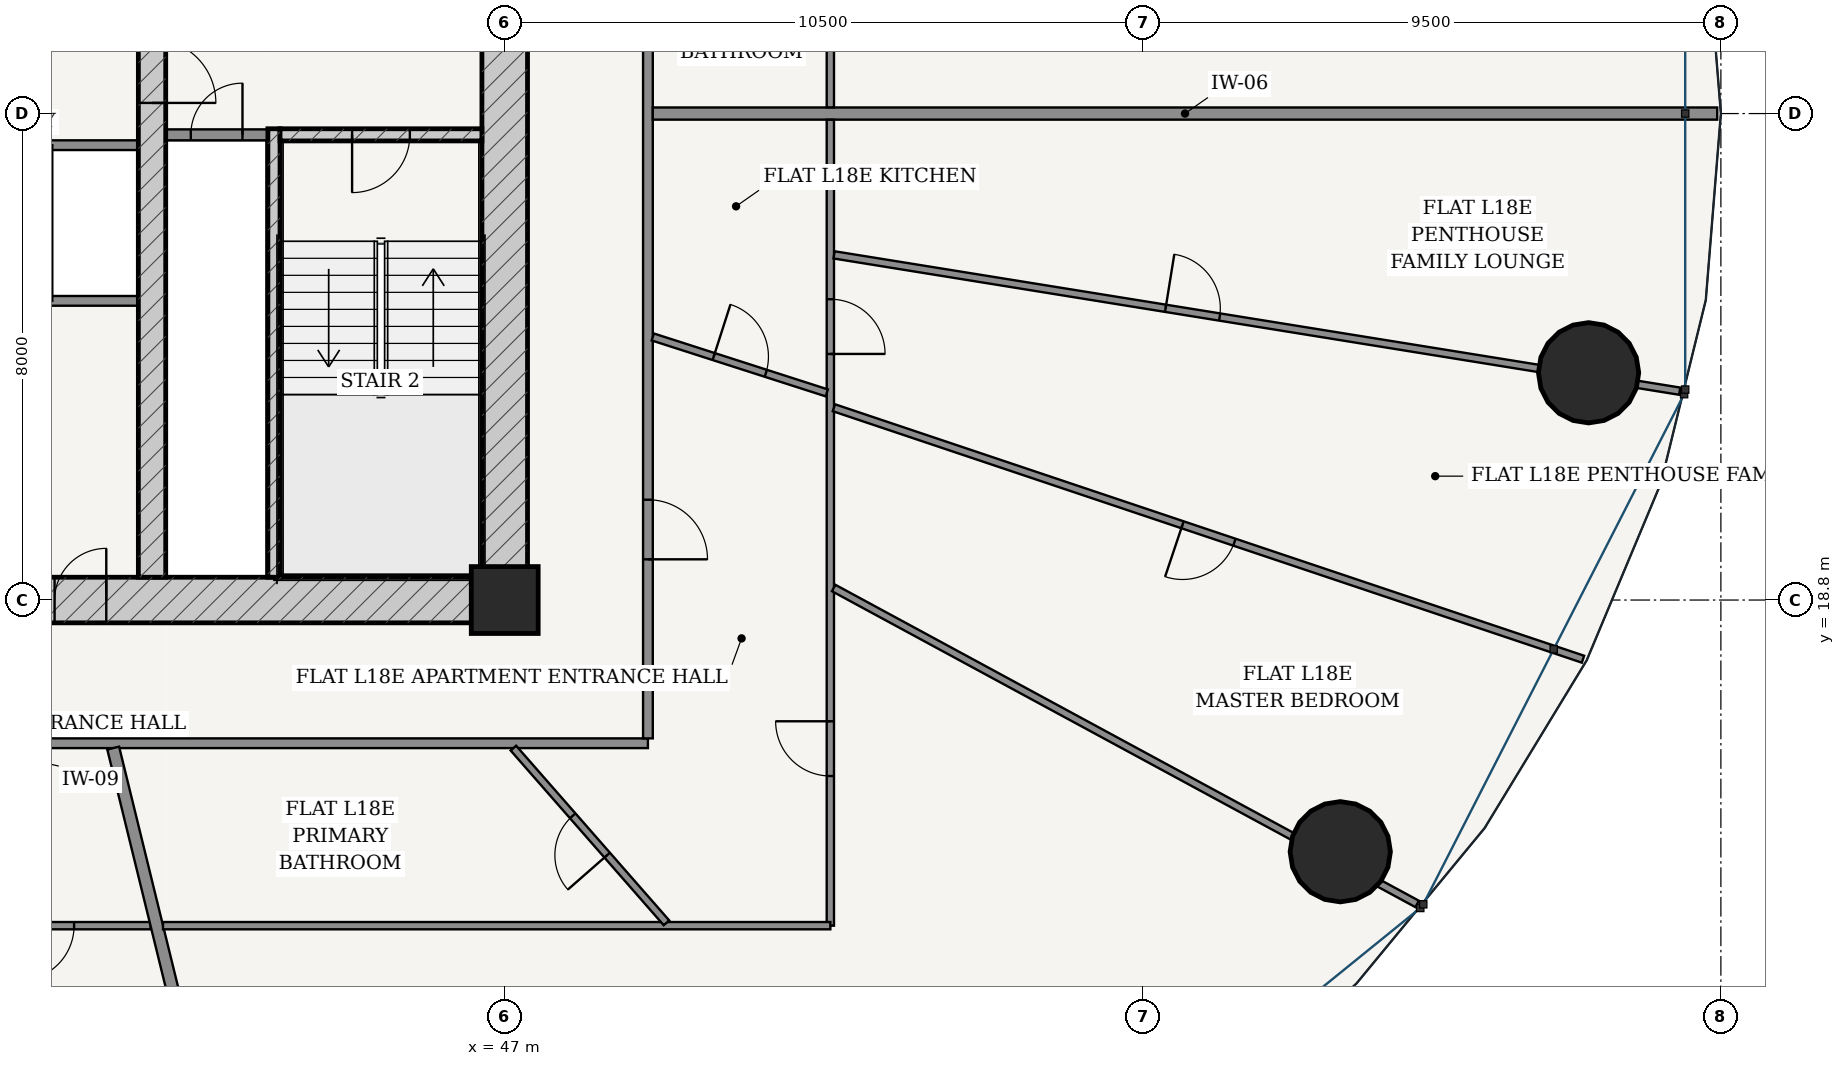
"""IFC4 building model, lengths in metres.
Left out: names, types, materials, properties, quantities, classifications, styles, units other than length and angle.
Written with IfcOpenShell. Run it as: python <this file> out.ifc"""

import sys

from ifc_helpers import new_model, si_unit, direction, frame, frame_2d, origin, origin_2d, place, context, subcontext, project, spatial, rectangle, hollow_circle, extrude, source, transform, mapped, element, fill, save


model = new_model("IFC4")
c1 = context("Model", 3, precision=1e-05, world=origin(), true_north=direction((-0.2419218956, 0.970295726276)))
c2 = subcontext(c1, "Body", "Model", "MODEL_VIEW")
j1 = project(units=[si_unit("LENGTHUNIT", "METRE"), si_unit("PLANEANGLEUNIT", "RADIAN")], contexts=[c1])
p1 = place(None, origin())
s1 = spatial("IfcSite", under=j1, at=p1, CompositionType="ELEMENT")
p2 = place(p1, origin())
s2 = spatial("IfcBuilding", under=s1, at=p2, CompositionType="ELEMENT")
p3 = place(p2, frame((0.0, 0.0, 70.8)))
s3 = spatial("IfcBuildingStorey", under=s2, at=p3, CompositionType="ELEMENT", Elevation=70.8)
p4 = place(p3, frame((47.0, 18.8, 0.0), z_axis=(0.0, 0.0, 1.0), x_axis=(1.0, 0.0, 0.0)))
e1 = element("IfcColumn", 1, at=p4, inside=s3, PredefinedType="COLUMN", context=c2, shape_type="SweptSolid", body=[
    extrude(rectangle(XDim=1.1, YDim=1.1, at=origin_2d()), origin(), (0.0, 0.0, 1.0), 3.6),
])
p5 = place(p3, frame((28.625, 18.8, 0.0), z_axis=(0.0, 0.0, 1.0), x_axis=(1.0, 0.0, 0.0)))
e2 = element("IfcWall", 2, at=p5, inside=s3, PredefinedType="SHEAR", context=c2, shape_type="SweptSolid", body=[
    extrude(rectangle(XDim=18.75, YDim=0.75, at=frame_2d((9.375, 0.0))), origin(), (0.0, 0.0, 1.0), 3.15),
])
p6 = place(p5, frame((6.927, 0.0, 0.0)))
e3 = element("IfcOpeningElement", 3, at=p6, cuts=e2, PredefinedType="OPENING", context=c2, shape_type="SweptSolid", body=[
    extrude(rectangle(XDim=0.85, YDim=2.1, at=frame_2d((0.425, 1.05))), frame((0.0, 0.385, 0.0), z_axis=(0.0, -1.0, 0.0), x_axis=(1.0, 0.0, 0.0)), (0.0, 0.0, 1.0), 0.77),
])
p7 = place(p5, frame((8.95, 0.0, 0.0)))
e4 = element("IfcOpeningElement", 4, at=p7, cuts=e2, PredefinedType="OPENING", context=c2, shape_type="SweptSolid", body=[
    extrude(rectangle(XDim=0.85, YDim=2.1, at=frame_2d((0.425, 1.05))), frame((0.0, 0.385, 0.0), z_axis=(0.0, -1.0, 0.0), x_axis=(1.0, 0.0, 0.0)), (0.0, 0.0, 1.0), 0.77),
])
p8 = place(p5, frame((10.972, 0.0, 0.0)))
e5 = element("IfcOpeningElement", 5, at=p8, cuts=e2, PredefinedType="OPENING", context=c2, shape_type="SweptSolid", body=[
    extrude(rectangle(XDim=0.85, YDim=2.1, at=frame_2d((0.425, 1.05))), frame((0.0, 0.385, 0.0), z_axis=(0.0, -1.0, 0.0), x_axis=(1.0, 0.0, 0.0)), (0.0, 0.0, 1.0), 0.77),
])
p9 = place(p3, frame((47.0, 19.175, 0.0), z_axis=(0.0, 0.0, 1.0), x_axis=(0.0, 1.0, 0.0)))
e6 = element("IfcWall", 6, at=p9, inside=s3, PredefinedType="SHEAR", context=c2, shape_type="SweptSolid", body=[
    extrude(rectangle(XDim=15.25, YDim=0.75, at=frame_2d((7.625, 0.0))), origin(), (0.0, 0.0, 1.0), 3.15),
])
p10 = place(p9, frame((9.875, 0.0, 0.0)))
e7 = element("IfcOpeningElement", 7, at=p10, cuts=e6, PredefinedType="OPENING", context=c2, shape_type="SweptSolid", body=[
    extrude(rectangle(XDim=1.5, YDim=2.2, at=frame_2d((0.75, 1.1))), frame((0.0, 0.385, 0.0), z_axis=(0.0, -1.0, 0.0), x_axis=(1.0, 0.0, 0.0)), (0.0, 0.0, 1.0), 0.77),
])
p11 = place(p3, frame((43.205, 19.175, 0.0), z_axis=(0.0, 0.0, 1.0), x_axis=(0.0, 1.0, 0.0)))
e8 = element("IfcWall", 8, at=p11, inside=s3, PredefinedType="SOLIDWALL", context=c2, shape_type="SweptSolid", body=[
    extrude(rectangle(XDim=7.375, YDim=0.2, at=frame_2d((3.688, 0.0))), origin(), (0.0, 0.0, 1.0), 3.15),
])
p12 = place(p3, frame((43.305, 26.45, 0.0), z_axis=(0.0, 0.0, 1.0), x_axis=(1.0, 0.0, 0.0)))
e9 = element("IfcWall", 9, at=p12, inside=s3, PredefinedType="SOLIDWALL", context=c2, shape_type="SweptSolid", body=[
    extrude(rectangle(XDim=3.32, YDim=0.2, at=frame_2d((1.66, 0.0))), origin(), (0.0, 0.0, 1.0), 3.15),
])
p13 = place(p12, frame((1.185, 0.0, 0.0)))
e10 = element("IfcOpeningElement", 10, at=p13, cuts=e9, PredefinedType="OPENING", context=c2, shape_type="SweptSolid", body=[
    extrude(rectangle(XDim=0.95, YDim=2.15, at=frame_2d((0.475, 1.075))), frame((0.0, 0.11, 0.0), z_axis=(0.0, -1.0, 0.0), x_axis=(1.0, 0.0, 0.0)), (0.0, 0.0, 1.0), 0.22),
])
p14 = place(p3, frame((41.2, 19.175, 0.0), z_axis=(0.0, 0.0, 1.0), x_axis=(0.0, 1.0, 0.0)))
e11 = element("IfcWall", 11, at=p14, inside=s3, PredefinedType="SHEAR", context=c2, shape_type="SweptSolid", body=[
    extrude(rectangle(XDim=15.25, YDim=0.45, at=frame_2d((7.625, 0.0))), origin(), (0.0, 0.0, 1.0), 3.15),
])
p15 = place(p14, frame((7.8, 0.0, 0.0)))
e12 = element("IfcOpeningElement", 12, at=p15, cuts=e11, PredefinedType="OPENING", context=c2, shape_type="SweptSolid", body=[
    extrude(rectangle(XDim=1.05, YDim=2.15, at=frame_2d((0.525, 1.075))), frame((0.0, 0.235, 0.0), z_axis=(0.0, -1.0, 0.0), x_axis=(1.0, 0.0, 0.0)), (0.0, 0.0, 1.0), 0.47),
])
for number, where, z_axis, x_axis in (
    (13, (60.741, 14.661, 0.0), (0.0, 0.0, 1.0), (1.0, 0.0, 0.0)),
    (14, (64.824, 22.537, 0.0), (0.0, 0.0, 1.0), (1.0, 0.0, 0.0)),
):
    element("IfcColumn", number, at=place(p3, frame(where, z_axis=z_axis, x_axis=x_axis)), inside=s3, PredefinedType="COLUMN", context=c2, shape_type="SweptSolid", body=[
        extrude(hollow_circle(Radius=0.825, WallThickness=0.05, at=origin_2d()), origin(), (0.0, 0.0, 1.0), 3.6),
    ])
p16 = place(p3, frame((41.425, 26.45, 0.0), z_axis=(0.0, 0.0, 1.0), x_axis=(1.0, 0.0, 0.0)))
e15 = element("IfcWall", 15, at=p16, inside=s3, PredefinedType="PARTITIONING", context=c2, shape_type="SweptSolid", body=[
    extrude(rectangle(XDim=1.675, YDim=0.18, at=frame_2d((0.837, 0.0))), origin(), (0.0, 0.0, 1.0), 3.15),
])
p17 = place(p16, frame((0.413, 0.0, 0.0)))
e16 = element("IfcOpeningElement", 16, at=p17, cuts=e15, PredefinedType="OPENING", context=c2, shape_type="SweptSolid", body=[
    extrude(rectangle(XDim=0.85, YDim=2.1, at=frame_2d((0.425, 1.05))), frame((0.0, 0.1, 0.0), z_axis=(0.0, -1.0, 0.0), x_axis=(1.0, 0.0, 0.0)), (0.0, 0.0, 1.0), 0.2),
])
for number, where, z_axis, x_axis in (
    (17, (35.025, 26.28, 0.0), (0.0, 0.0, 1.0), (1.0, 0.0, 0.0)),
    (18, (35.025, 23.72, 0.0), (0.0, 0.0, 1.0), (1.0, 0.0, 0.0)),
):
    element("IfcWall", number, at=place(p3, frame(where, z_axis=z_axis, x_axis=x_axis)), inside=s3, PredefinedType="PARTITIONING", context=c2, shape_type="SweptSolid", body=[
        extrude(rectangle(XDim=5.95, YDim=0.16, at=frame_2d((2.975, 0.0))), origin(), (0.0, 0.0, 1.0), 3.15),
    ])
p18 = place(p3, frame((26.645, 16.445, 0.0), z_axis=(0.0, 0.0, 1.0), x_axis=(1.0, 0.0, 0.0)))
e19 = element("IfcWall", 19, at=p18, inside=s3, PredefinedType="PARTITIONING", context=c2, shape_type="SweptSolid", body=[
    extrude(rectangle(XDim=22.71, YDim=0.16, at=frame_2d((11.355, 0.0))), origin(), (0.0, 0.0, 1.0), 2.596),
])
p19 = place(p18, frame((5.419, 0.0, 0.0)))
e20 = element("IfcOpeningElement", 20, at=p19, cuts=e19, PredefinedType="OPENING", context=c2, shape_type="SweptSolid", body=[
    extrude(rectangle(XDim=0.98, YDim=2.2, at=frame_2d((0.49, 1.1))), frame((0.0, 0.09, 0.0), z_axis=(0.0, -1.0, 0.0), x_axis=(1.0, 0.0, 0.0)), (0.0, 0.0, 1.0), 0.18),
])
p20 = place(p3, frame((49.355, 16.525, 0.0), z_axis=(0.0, 0.0, 1.0), x_axis=(0.0, 1.0, 0.0)))
e21 = element("IfcWall", 21, at=p20, inside=s3, PredefinedType="PARTITIONING", context=c2, shape_type="SweptSolid", body=[
    extrude(rectangle(XDim=20.55, YDim=0.16, at=frame_2d((10.275, 0.0))), origin(), (0.0, 0.0, 1.0), 2.596),
])
p21 = place(p20, frame((16.537, 0.0, 0.0)))
e22 = element("IfcOpeningElement", 22, at=p21, cuts=e21, PredefinedType="OPENING", context=c2, shape_type="SweptSolid", body=[
    extrude(rectangle(XDim=0.98, YDim=2.2, at=frame_2d((0.49, 1.1))), frame((0.0, 0.09, 0.0), z_axis=(0.0, -1.0, 0.0), x_axis=(1.0, 0.0, 0.0)), (0.0, 0.0, 1.0), 0.18),
])
p22 = place(p20, frame((2.945, 0.0, 0.0)))
e23 = element("IfcOpeningElement", 23, at=p22, cuts=e21, PredefinedType="OPENING", context=c2, shape_type="SweptSolid", body=[
    extrude(rectangle(XDim=0.98, YDim=2.2, at=frame_2d((0.49, 1.1))), frame((0.0, 0.09, 0.0), z_axis=(0.0, -1.0, 0.0), x_axis=(1.0, 0.0, 0.0)), (0.0, 0.0, 1.0), 0.18),
])
p23 = place(p3, frame((49.435, 26.8, 0.0), z_axis=(0.0, 0.0, 1.0), x_axis=(1.0, 0.0, 0.0)))
e24 = element("IfcWall", 24, at=p23, inside=s3, PredefinedType="PARTITIONING", context=c2, shape_type="SweptSolid", body=[
    extrude(rectangle(XDim=17.505, YDim=0.2, at=frame_2d((8.752, 0.0))), origin(), (0.0, 0.0, 1.0), 2.666),
])
p24 = place(p3, frame((52.355, 40.155, 0.0), z_axis=(0.0, 0.0, 1.0), x_axis=(0.0, -1.0, 0.0)))
e25 = element("IfcWall", 25, at=p24, inside=s3, PredefinedType="PARTITIONING", context=c2, shape_type="SweptSolid", body=[
    extrude(rectangle(XDim=13.253, YDim=0.12, at=frame_2d((6.626, 0.0))), origin(), (0.0, 0.0, 1.0), 2.596),
])
p25 = place(p24, frame((6.853, 0.0, 0.0)))
e26 = element("IfcOpeningElement", 26, at=p25, cuts=e25, PredefinedType="OPENING", context=c2, shape_type="SweptSolid", body=[
    extrude(rectangle(XDim=0.9, YDim=2.15, at=frame_2d((0.45, 1.075))), frame((0.0, 0.07, 0.0), z_axis=(0.0, -1.0, 0.0), x_axis=(1.0, 0.0, 0.0)), (0.0, 0.0, 1.0), 0.14),
])
p26 = place(p3, frame((41.176, 13.445, 0.0), z_axis=(0.0, 0.0, 1.0), x_axis=(-1.0, 0.0, 0.0)))
e27 = element("IfcWall", 27, at=p26, inside=s3, PredefinedType="PARTITIONING", context=c2, shape_type="SweptSolid", body=[
    extrude(rectangle(XDim=17.531, YDim=0.12, at=frame_2d((8.766, 0.0))), origin(), (0.0, 0.0, 1.0), 2.596),
])
p27 = place(p26, frame((10.299, 0.0, 0.0)))
e28 = element("IfcOpeningElement", 28, at=p27, cuts=e27, PredefinedType="OPENING", context=c2, shape_type="SweptSolid", body=[
    extrude(rectangle(XDim=0.9, YDim=2.15, at=frame_2d((0.45, 1.075))), frame((0.0, 0.07, 0.0), z_axis=(0.0, -1.0, 0.0), x_axis=(1.0, 0.0, 0.0)), (0.0, 0.0, 1.0), 0.14),
])
p28 = place(p26, frame((1.258, 0.0, 0.0)))
e29 = element("IfcOpeningElement", 29, at=p28, cuts=e27, PredefinedType="OPENING", context=c2, shape_type="SweptSolid", body=[
    extrude(rectangle(XDim=0.9, YDim=2.15, at=frame_2d((0.45, 1.075))), frame((0.0, 0.07, 0.0), z_axis=(0.0, -1.0, 0.0), x_axis=(1.0, 0.0, 0.0)), (0.0, 0.0, 1.0), 0.14),
])
p29 = place(p3, frame((40.562, 16.365, 0.0), z_axis=(0.0, 0.0, 1.0), x_axis=(0.238380116209, -0.971171931326, 0.0)))
e30 = element("IfcWall", 30, at=p29, inside=s3, PredefinedType="PARTITIONING", context=c2, shape_type="SweptSolid", body=[
    extrude(rectangle(XDim=12.877, YDim=0.2, at=frame_2d((6.438, 0.0))), origin(), (0.0, 0.0, 1.0), 2.5),
])
p30 = place(p3, frame((52.355, 26.698, 0.0), z_axis=(0.0, 0.0, 1.0), x_axis=(0.0, -1.0, 0.0)))
e31 = element("IfcWall", 31, at=p30, inside=s3, PredefinedType="PARTITIONING", context=c2, shape_type="SweptSolid", body=[
    extrude(rectangle(XDim=13.253, YDim=0.12, at=frame_2d((6.626, 0.0))), origin(), (0.0, 0.0, 1.0), 2.596),
])
p31 = place(p30, frame((9.892, 0.0, 0.0)))
e32 = element("IfcOpeningElement", 32, at=p31, cuts=e31, PredefinedType="OPENING", context=c2, shape_type="SweptSolid", body=[
    extrude(rectangle(XDim=0.9, YDim=2.15, at=frame_2d((0.45, 1.075))), frame((0.0, 0.07, 0.0), z_axis=(0.0, -1.0, 0.0), x_axis=(1.0, 0.0, 0.0)), (0.0, 0.0, 1.0), 0.14),
])
p32 = place(p30, frame((2.951, 0.0, 0.0)))
e33 = element("IfcOpeningElement", 33, at=p32, cuts=e31, PredefinedType="OPENING", context=c2, shape_type="SweptSolid", body=[
    extrude(rectangle(XDim=0.9, YDim=2.15, at=frame_2d((0.45, 1.075))), frame((0.0, 0.07, 0.0), z_axis=(0.0, -1.0, 0.0), x_axis=(1.0, 0.0, 0.0)), (0.0, 0.0, 1.0), 0.14),
])
p33 = place(p3, frame((52.355, 13.445, 0.0), z_axis=(0.0, 0.0, 1.0), x_axis=(-1.0, 0.0, 0.0)))
e34 = element("IfcWall", 34, at=p33, inside=s3, PredefinedType="PARTITIONING", context=c2, shape_type="SweptSolid", body=[
    extrude(rectangle(XDim=10.975, YDim=0.12, at=frame_2d((5.487, 0.0))), origin(), (0.0, 0.0, 1.0), 2.596),
])
p34 = place(p3, frame((52.409, 18.998, 0.0), z_axis=(0.0, 0.0, 1.0), x_axis=(0.879373936002, -0.476131789193, 0.0)))
e35 = element("IfcWall", 35, at=p34, inside=s3, PredefinedType="PARTITIONING", context=c2, shape_type="SweptSolid", body=[
    extrude(rectangle(XDim=10.913, YDim=0.12, at=frame_2d((5.456, 0.0))), origin(), (0.0, 0.0, 1.0), 2.5),
])
p35 = place(p3, frame((52.414, 21.962, 0.0), z_axis=(0.0, 0.0, 1.0), x_axis=(0.948021751459, -0.318205529118, 0.0)))
e36 = element("IfcWall", 36, at=p35, inside=s3, PredefinedType="PARTITIONING", context=c2, shape_type="SweptSolid", body=[
    extrude(rectangle(XDim=12.994, YDim=0.12, at=frame_2d((6.497, 0.0))), origin(), (0.0, 0.0, 1.0), 2.666),
])
p36 = place(p35, frame((6.047, 0.0, 0.0)))
e37 = element("IfcOpeningElement", 37, at=p36, cuts=e36, PredefinedType="OPENING", context=c2, shape_type="SweptSolid", body=[
    extrude(rectangle(XDim=0.9, YDim=2.15, at=frame_2d((0.45, 1.075))), frame((0.0, 0.07, 0.0), z_axis=(0.0, -1.0, 0.0), x_axis=(1.0, 0.0, 0.0)), (0.0, 0.0, 1.0), 0.14),
])
p37 = place(p3, frame((52.416, 24.476, 0.0), z_axis=(0.0, 0.0, 1.0), x_axis=(0.987257727093, -0.159129445092, 0.0)))
e38 = element("IfcWall", 38, at=p37, inside=s3, PredefinedType="PARTITIONING", context=c2, shape_type="SweptSolid", body=[
    extrude(rectangle(XDim=14.086, YDim=0.12, at=frame_2d((7.043, 0.0))), origin(), (0.0, 0.0, 1.0), 2.5),
])
p38 = place(p37, frame((5.522, 0.0, 0.0)))
e39 = element("IfcOpeningElement", 39, at=p38, cuts=e38, PredefinedType="OPENING", context=c2, shape_type="SweptSolid", body=[
    extrude(rectangle(XDim=0.9, YDim=2.15, at=frame_2d((0.45, 1.075))), frame((0.0, 0.07, 0.0), z_axis=(0.0, -1.0, 0.0), x_axis=(1.0, 0.0, 0.0)), (0.0, 0.0, 1.0), 0.14),
])
p39 = place(p3, frame((47.143, 16.365, 0.0), z_axis=(0.0, 0.0, 1.0), x_axis=(0.659015717138, -0.752129167474, 0.0)))
e40 = element("IfcWall", 40, at=p39, inside=s3, PredefinedType="PARTITIONING", context=c2, shape_type="SweptSolid", body=[
    extrude(rectangle(XDim=3.82, YDim=0.12, at=frame_2d((1.91, 0.0))), origin(), (0.0, 0.0, 1.0), 2.825),
])
p40 = place(p39, frame((1.48, 0.0, 0.0)))
e41 = element("IfcOpeningElement", 41, at=p40, cuts=e40, PredefinedType="OPENING", context=c2, shape_type="SweptSolid", body=[
    extrude(rectangle(XDim=0.86, YDim=2.15, at=frame_2d((0.43, 1.075))), frame((0.0, 0.07, 0.0), z_axis=(0.0, -1.0, 0.0), x_axis=(1.0, 0.0, 0.0)), (0.0, 0.0, 1.0), 0.14),
])
p41 = place(p3, frame((49.435, 23.126, 0.0), z_axis=(0.0, 0.0, 1.0), x_axis=(0.952040395248, -0.305972361197, 0.0)))
e42 = element("IfcWall", 42, at=p41, inside=s3, PredefinedType="PARTITIONING", context=c2, shape_type="SweptSolid", body=[
    extrude(rectangle(XDim=3.005, YDim=0.12, at=frame_2d((1.502, 0.0))), origin(), (0.0, 0.0, 1.0), 3.15),
])
p42 = place(p41, frame((1.052, 0.0, 0.0)))
e43 = element("IfcOpeningElement", 43, at=p42, cuts=e42, PredefinedType="OPENING", context=c2, shape_type="SweptSolid", body=[
    extrude(rectangle(XDim=0.9, YDim=2.15, at=frame_2d((0.45, 1.075))), frame((0.0, 0.07, 0.0), z_axis=(0.0, -1.0, 0.0), x_axis=(1.0, 0.0, 0.0)), (0.0, 0.0, 1.0), 0.14),
])
m1 = source(origin(), c2, "Body", "SweptSolid", [
    extrude(rectangle(XDim=1.05, YDim=2.15, at=frame_2d((0.525, 1.075))), frame((0.0, 0.025, 0.0), z_axis=(0.0, -1.0, 0.0), x_axis=(1.0, 0.0, 0.0)), (0.0, 0.0, 1.0), 0.05),
])
p43 = place(p15, frame((1.05, 0.0, 0.0), z_axis=(0.0, 0.0, 1.0), x_axis=(-1.0, 0.0, 0.0)))
e44 = element("IfcDoor", 44, at=p43, inside=s3, OperationType="SINGLE_SWING_RIGHT", PredefinedType="DOOR", context=c2, shape_type="MappedRepresentation", body=[
    mapped(m1, transform((0.0, 0.0, 0.0), scale=1.0)),
])
fill(e12, e44)
m2 = source(origin(), c2, "Body", "SweptSolid", [
    extrude(rectangle(XDim=0.95, YDim=2.15, at=frame_2d((0.475, 1.075))), frame((0.0, 0.025, 0.0), z_axis=(0.0, -1.0, 0.0), x_axis=(1.0, 0.0, 0.0)), (0.0, 0.0, 1.0), 0.05),
])
p44 = place(p13, frame((0.95, 0.0, 0.0), z_axis=(0.0, 0.0, 1.0), x_axis=(-1.0, 0.0, 0.0)))
e45 = element("IfcDoor", 45, at=p44, inside=s3, OperationType="SINGLE_SWING_RIGHT", PredefinedType="DOOR", context=c2, shape_type="MappedRepresentation", body=[
    mapped(m2, transform((0.0, 0.0, 0.0), scale=1.0)),
])
fill(e10, e45)
m3 = source(origin(), c2, "Body", "SweptSolid", [
    extrude(rectangle(XDim=0.85, YDim=2.1, at=frame_2d((0.425, 1.05))), frame((0.0, 0.025, 0.0), z_axis=(0.0, -1.0, 0.0), x_axis=(1.0, 0.0, 0.0)), (0.0, 0.0, 1.0), 0.05),
])
p45 = place(p17, origin())
e46 = element("IfcDoor", 46, at=p45, inside=s3, OperationType="SINGLE_SWING_RIGHT", PredefinedType="DOOR", context=c2, shape_type="MappedRepresentation", body=[
    mapped(m3, transform((0.0, 0.0, 0.0), scale=1.0)),
])
fill(e16, e46)
p46 = place(p8, origin())
e47 = element("IfcDoor", 47, at=p46, inside=s3, OperationType="SINGLE_SWING_RIGHT", PredefinedType="DOOR", context=c2, shape_type="MappedRepresentation", body=[
    mapped(m3, transform((0.0, 0.0, 0.0), scale=1.0)),
])
fill(e5, e47)
m4 = source(origin(), c2, "Body", "SweptSolid", [
    extrude(rectangle(XDim=0.9, YDim=2.15, at=frame_2d((0.45, 1.075))), frame((0.0, 0.025, 0.0), z_axis=(0.0, -1.0, 0.0), x_axis=(1.0, 0.0, 0.0)), (0.0, 0.0, 1.0), 0.05),
])
p47 = place(p28, origin())
e48 = element("IfcDoor", 48, at=p47, inside=s3, OperationType="SINGLE_SWING_RIGHT", PredefinedType="DOOR", context=c2, shape_type="MappedRepresentation", body=[
    mapped(m4, transform((0.0, 0.0, 0.0), scale=1.0)),
])
fill(e29, e48)
m5 = source(origin(), c2, "Body", "SweptSolid", [
    extrude(rectangle(XDim=0.98, YDim=2.2, at=frame_2d((0.49, 1.1))), frame((0.0, 0.025, 0.0), z_axis=(0.0, -1.0, 0.0), x_axis=(1.0, 0.0, 0.0)), (0.0, 0.0, 1.0), 0.05),
])
p48 = place(p22, frame((0.98, 0.0, 0.0), z_axis=(0.0, 0.0, 1.0), x_axis=(-1.0, 0.0, 0.0)))
e49 = element("IfcDoor", 49, at=p48, inside=s3, OperationType="SINGLE_SWING_RIGHT", PredefinedType="DOOR", context=c2, shape_type="MappedRepresentation", body=[
    mapped(m5, transform((0.0, 0.0, 0.0), scale=1.0)),
])
fill(e23, e49)
m6 = source(origin(), c2, "Body", "SweptSolid", [
    extrude(rectangle(XDim=0.86, YDim=2.15, at=frame_2d((0.43, 1.075))), frame((0.0, 0.025, 0.0), z_axis=(0.0, -1.0, 0.0), x_axis=(1.0, 0.0, 0.0)), (0.0, 0.0, 1.0), 0.05),
])
p49 = place(p40, frame((0.86, 0.0, 0.0), z_axis=(0.0, 0.0, 1.0), x_axis=(-1.0, 0.0, 0.0)))
e50 = element("IfcDoor", 50, at=p49, inside=s3, OperationType="SINGLE_SWING_LEFT", PredefinedType="DOOR", context=c2, shape_type="MappedRepresentation", body=[
    mapped(m6, transform((0.0, 0.0, 0.0), scale=1.0)),
])
fill(e41, e50)
p50 = place(p31, frame((0.9, 0.0, 0.0), z_axis=(0.0, 0.0, 1.0), x_axis=(-1.0, 0.0, 0.0)))
e51 = element("IfcDoor", 51, at=p50, inside=s3, OperationType="SINGLE_SWING_RIGHT", PredefinedType="DOOR", context=c2, shape_type="MappedRepresentation", body=[
    mapped(m4, transform((0.0, 0.0, 0.0), scale=1.0)),
])
fill(e32, e51)
p51 = place(p42, origin())
e52 = element("IfcDoor", 52, at=p51, inside=s3, OperationType="SINGLE_SWING_LEFT", PredefinedType="DOOR", context=c2, shape_type="MappedRepresentation", body=[
    mapped(m4, transform((0.0, 0.0, 0.0), scale=1.0)),
])
fill(e43, e52)
p52 = place(p32, origin())
e53 = element("IfcDoor", 53, at=p52, inside=s3, OperationType="SINGLE_SWING_RIGHT", PredefinedType="DOOR", context=c2, shape_type="MappedRepresentation", body=[
    mapped(m4, transform((0.0, 0.0, 0.0), scale=1.0)),
])
fill(e33, e53)
p53 = place(p38, origin())
e54 = element("IfcDoor", 54, at=p53, inside=s3, OperationType="SINGLE_SWING_LEFT", PredefinedType="DOOR", context=c2, shape_type="MappedRepresentation", body=[
    mapped(m4, transform((0.0, 0.0, 0.0), scale=1.0)),
])
fill(e39, e54)
p54 = place(p36, frame((0.9, 0.0, 0.0), z_axis=(0.0, 0.0, 1.0), x_axis=(-1.0, 0.0, 0.0)))
e55 = element("IfcDoor", 55, at=p54, inside=s3, OperationType="SINGLE_SWING_RIGHT", PredefinedType="DOOR", context=c2, shape_type="MappedRepresentation", body=[
    mapped(m4, transform((0.0, 0.0, 0.0), scale=1.0)),
])
fill(e37, e55)
save(model, sys.argv[1])
